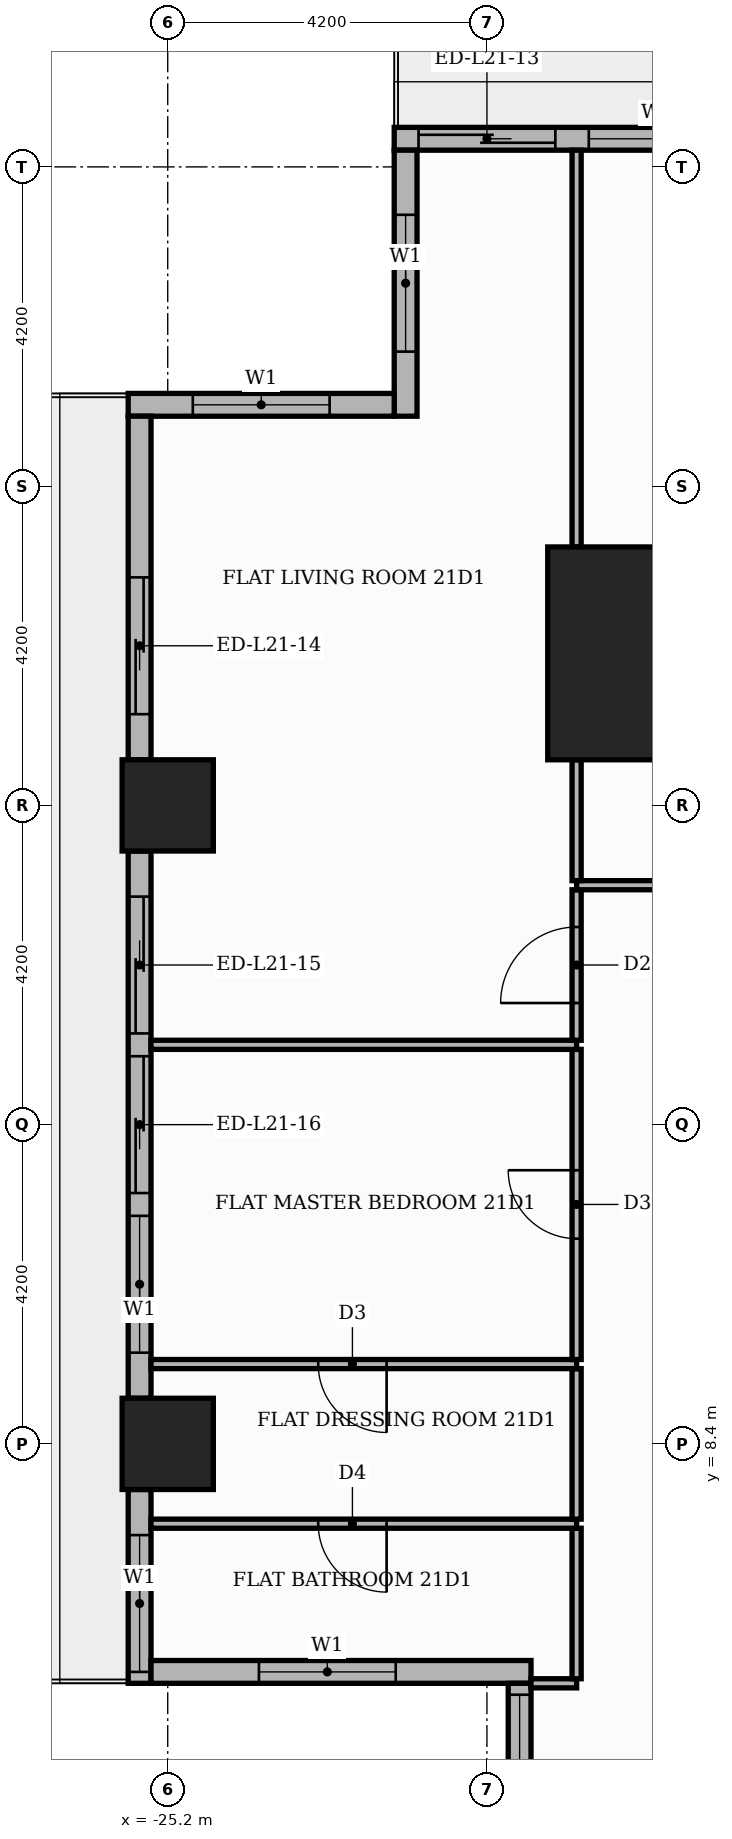
"""IFC4 building model, lengths in metres.
Left out: names, types, materials, properties, quantities, classifications, styles, units other than length and angle.
Written with IfcOpenShell. Run it as: python <this file> out.ifc"""

import sys

from ifc_helpers import new_model, si_unit, direction, frame, frame_2d, origin, origin_2d, place, context, subcontext, project, spatial, rectangle, extrude, element, fill, save


model = new_model("IFC4")
c1 = context("Model", 3, precision=1e-05, world=origin(), true_north=direction((0.0, 1.0)))
c2 = subcontext(c1, "Body", "Model", "MODEL_VIEW")
j1 = project(units=[si_unit("LENGTHUNIT", "METRE"), si_unit("PLANEANGLEUNIT", "RADIAN")], contexts=[c1])
p1 = place(None, origin())
s1 = spatial("IfcSite", under=j1, at=p1, CompositionType="ELEMENT")
p2 = place(p1, origin())
s2 = spatial("IfcBuilding", under=s1, at=p2, CompositionType="ELEMENT")
p3 = place(p2, frame((0.0, 0.0, 90.9)))
s3 = spatial("IfcBuildingStorey", under=s2, at=p3, CompositionType="ELEMENT", Elevation=90.9)
p4 = place(p3, frame((-18.8, 18.8, 0.0), z_axis=(0.0, 0.0, 1.0), x_axis=(1.0, 0.0, 0.0)))
e1 = element("IfcColumn", 1, at=p4, inside=s3, PredefinedType="COLUMN", context=c2, shape_type="SweptSolid", body=[
    extrude(rectangle(XDim=2.8, YDim=2.8, at=origin_2d()), origin(), (0.0, 0.0, 1.0), 3.9),
])
for number, where, z_axis, x_axis in (
    (2, (-25.2, 8.4, 0.0), (0.0, 0.0, 1.0), (1.0, 0.0, 0.0)),
    (3, (-25.2, 16.8, 0.0), (0.0, 0.0, 1.0), (1.0, 0.0, 0.0)),
):
    element("IfcColumn", number, at=place(p3, frame(where, z_axis=z_axis, x_axis=x_axis)), inside=s3, PredefinedType="COLUMN", context=c2, shape_type="SweptSolid", body=[
        extrude(rectangle(XDim=1.2, YDim=1.2, at=origin_2d()), origin(), (0.0, 0.0, 1.0), 3.9),
    ])
p5 = place(p3, frame((-17.4, 25.57, 0.0), z_axis=(0.0, 0.0, 1.0), x_axis=(-1.0, 0.0, 0.0)))
e4 = element("IfcWall", 4, at=p5, inside=s3, PredefinedType="STANDARD", context=c2, shape_type="SweptSolid", body=[
    extrude(rectangle(XDim=4.82, YDim=0.3, at=frame_2d((2.41, 0.0))), origin(), (0.0, 0.0, 1.0), 3.48),
])
p6 = place(p5, frame((2.7, 0.0, 0.0)))
e5 = element("IfcOpeningElement", 5, at=p6, cuts=e4, PredefinedType="OPENING", context=c2, shape_type="SweptSolid", body=[
    extrude(rectangle(XDim=1.8, YDim=2.4, at=frame_2d((0.9, 1.2))), frame((0.0, 0.16, 0.0), z_axis=(0.0, -1.0, 0.0), x_axis=(1.0, 0.0, 0.0)), (0.0, 0.0, 1.0), 0.32),
])
p7 = place(p5, frame((0.46, 0.0, 0.9)))
e6 = element("IfcOpeningElement", 6, at=p7, cuts=e4, PredefinedType="OPENING", context=c2, shape_type="SweptSolid", body=[
    extrude(rectangle(XDim=1.8, YDim=2.1, at=frame_2d((0.9, 1.05))), frame((0.0, 0.16, 0.0), z_axis=(0.0, -1.0, 0.0), x_axis=(1.0, 0.0, 0.0)), (0.0, 0.0, 1.0), 0.32),
])
p8 = place(p3, frame((-22.07, 25.42, 0.0), z_axis=(0.0, 0.0, 1.0), x_axis=(0.0, -1.0, 0.0)))
e7 = element("IfcWall", 7, at=p8, inside=s3, PredefinedType="STANDARD", context=c2, shape_type="SweptSolid", body=[
    extrude(rectangle(XDim=3.5, YDim=0.3, at=frame_2d((1.75, 0.0))), origin(), (0.0, 0.0, 1.0), 3.48),
])
p9 = place(p8, frame((0.85, 0.0, 0.9)))
e8 = element("IfcOpeningElement", 8, at=p9, cuts=e7, PredefinedType="OPENING", context=c2, shape_type="SweptSolid", body=[
    extrude(rectangle(XDim=1.8, YDim=2.1, at=frame_2d((0.9, 1.05))), frame((0.0, 0.16, 0.0), z_axis=(0.0, -1.0, 0.0), x_axis=(1.0, 0.0, 0.0)), (0.0, 0.0, 1.0), 0.32),
])
p10 = place(p3, frame((-22.22, 22.07, 0.0), z_axis=(0.0, 0.0, 1.0), x_axis=(-1.0, 0.0, 0.0)))
e9 = element("IfcWall", 9, at=p10, inside=s3, PredefinedType="STANDARD", context=c2, shape_type="SweptSolid", body=[
    extrude(rectangle(XDim=3.5, YDim=0.3, at=frame_2d((1.75, 0.0))), origin(), (0.0, 0.0, 1.0), 3.48),
])
p11 = place(p10, frame((0.85, 0.0, 0.9)))
e10 = element("IfcOpeningElement", 10, at=p11, cuts=e9, PredefinedType="OPENING", context=c2, shape_type="SweptSolid", body=[
    extrude(rectangle(XDim=1.8, YDim=2.1, at=frame_2d((0.9, 1.05))), frame((0.0, 0.16, 0.0), z_axis=(0.0, -1.0, 0.0), x_axis=(1.0, 0.0, 0.0)), (0.0, 0.0, 1.0), 0.32),
])
p12 = place(p3, frame((-25.57, 21.92, 0.0), z_axis=(0.0, 0.0, 1.0), x_axis=(0.0, -1.0, 0.0)))
e11 = element("IfcWall", 11, at=p12, inside=s3, PredefinedType="STANDARD", context=c2, shape_type="SweptSolid", body=[
    extrude(rectangle(XDim=4.52, YDim=0.3, at=frame_2d((2.26, 0.0))), origin(), (0.0, 0.0, 1.0), 3.48),
])
p13 = place(p12, frame((2.12, 0.0, 0.0)))
e12 = element("IfcOpeningElement", 12, at=p13, cuts=e11, PredefinedType="OPENING", context=c2, shape_type="SweptSolid", body=[
    extrude(rectangle(XDim=1.8, YDim=2.4, at=frame_2d((0.9, 1.2))), frame((0.0, 0.16, 0.0), z_axis=(0.0, -1.0, 0.0), x_axis=(1.0, 0.0, 0.0)), (0.0, 0.0, 1.0), 0.32),
])
p14 = place(p3, frame((-25.57, 16.2, 0.0), z_axis=(0.0, 0.0, 1.0), x_axis=(0.0, -1.0, 0.0)))
e13 = element("IfcWall", 13, at=p14, inside=s3, PredefinedType="STANDARD", context=c2, shape_type="SweptSolid", body=[
    extrude(rectangle(XDim=7.2, YDim=0.3, at=frame_2d((3.6, 0.0))), origin(), (0.0, 0.0, 1.0), 3.48),
])
p15 = place(p14, frame((0.6, 0.0, 0.0)))
e14 = element("IfcOpeningElement", 14, at=p15, cuts=e13, PredefinedType="OPENING", context=c2, shape_type="SweptSolid", body=[
    extrude(rectangle(XDim=1.8, YDim=2.4, at=frame_2d((0.9, 1.2))), frame((0.0, 0.16, 0.0), z_axis=(0.0, -1.0, 0.0), x_axis=(1.0, 0.0, 0.0)), (0.0, 0.0, 1.0), 0.32),
])
p16 = place(p14, frame((2.7, 0.0, 0.0)))
e15 = element("IfcOpeningElement", 15, at=p16, cuts=e13, PredefinedType="OPENING", context=c2, shape_type="SweptSolid", body=[
    extrude(rectangle(XDim=1.8, YDim=2.4, at=frame_2d((0.9, 1.2))), frame((0.0, 0.16, 0.0), z_axis=(0.0, -1.0, 0.0), x_axis=(1.0, 0.0, 0.0)), (0.0, 0.0, 1.0), 0.32),
])
p17 = place(p14, frame((4.8, 0.0, 0.9)))
e16 = element("IfcOpeningElement", 16, at=p17, cuts=e13, PredefinedType="OPENING", context=c2, shape_type="SweptSolid", body=[
    extrude(rectangle(XDim=1.8, YDim=2.1, at=frame_2d((0.9, 1.05))), frame((0.0, 0.16, 0.0), z_axis=(0.0, -1.0, 0.0), x_axis=(1.0, 0.0, 0.0)), (0.0, 0.0, 1.0), 0.32),
])
p18 = place(p3, frame((-25.57, 7.8, 0.0), z_axis=(0.0, 0.0, 1.0), x_axis=(0.0, -1.0, 0.0)))
e17 = element("IfcWall", 17, at=p18, inside=s3, PredefinedType="STANDARD", context=c2, shape_type="SweptSolid", body=[
    extrude(rectangle(XDim=2.55, YDim=0.3, at=frame_2d((1.275, 0.0))), origin(), (0.0, 0.0, 1.0), 3.48),
])
p19 = place(p18, frame((0.6, 0.0, 0.9)))
e18 = element("IfcOpeningElement", 18, at=p19, cuts=e17, PredefinedType="OPENING", context=c2, shape_type="SweptSolid", body=[
    extrude(rectangle(XDim=1.8, YDim=2.1, at=frame_2d((0.9, 1.05))), frame((0.0, 0.16, 0.0), z_axis=(0.0, -1.0, 0.0), x_axis=(1.0, 0.0, 0.0)), (0.0, 0.0, 1.0), 0.32),
])
p20 = place(p3, frame((-25.42, 5.4, 0.0), z_axis=(0.0, 0.0, 1.0), x_axis=(1.0, 0.0, 0.0)))
e19 = element("IfcWall", 19, at=p20, inside=s3, PredefinedType="STANDARD", context=c2, shape_type="SweptSolid", body=[
    extrude(rectangle(XDim=5.0, YDim=0.3, at=frame_2d((2.5, 0.0))), origin(), (0.0, 0.0, 1.0), 3.48),
])
p21 = place(p20, frame((1.42, 0.0, 0.9)))
e20 = element("IfcOpeningElement", 20, at=p21, cuts=e19, PredefinedType="OPENING", context=c2, shape_type="SweptSolid", body=[
    extrude(rectangle(XDim=1.8, YDim=2.1, at=frame_2d((0.9, 1.05))), frame((0.0, 0.16, 0.0), z_axis=(0.0, -1.0, 0.0), x_axis=(1.0, 0.0, 0.0)), (0.0, 0.0, 1.0), 0.32),
])
p22 = place(p3, frame((-20.57, 5.25, 0.0), z_axis=(0.0, 0.0, 1.0), x_axis=(0.0, -1.0, 0.0)))
e21 = element("IfcWall", 21, at=p22, inside=s3, PredefinedType="STANDARD", context=c2, shape_type="SweptSolid", body=[
    extrude(rectangle(XDim=10.8, YDim=0.3, at=frame_2d((5.4, 0.0))), origin(), (0.0, 0.0, 1.0), 3.48),
])
p23 = place(p22, frame((0.15, 0.0, 0.9)))
e22 = element("IfcOpeningElement", 22, at=p23, cuts=e21, PredefinedType="OPENING", context=c2, shape_type="SweptSolid", body=[
    extrude(rectangle(XDim=6.0, YDim=2.1, at=frame_2d((3.0, 1.05))), frame((0.0, 0.16, 0.0), z_axis=(0.0, -1.0, 0.0), x_axis=(1.0, 0.0, 0.0)), (0.0, 0.0, 1.0), 0.32),
])
p24 = place(p22, frame((6.45, 0.0, 0.9)))
e23 = element("IfcOpeningElement", 23, at=p24, cuts=e21, PredefinedType="OPENING", context=c2, shape_type="SweptSolid", body=[
    extrude(rectangle(XDim=3.9, YDim=2.1, at=frame_2d((1.95, 1.05))), frame((0.0, 0.16, 0.0), z_axis=(0.0, -1.0, 0.0), x_axis=(1.0, 0.0, 0.0)), (0.0, 0.0, 1.0), 0.32),
])
p25 = place(p3, frame((-20.42, 5.25, 0.0), z_axis=(0.0, 0.0, 1.0), x_axis=(1.0, 0.0, 0.0)))
e24 = element("IfcWall", 24, at=p25, inside=s3, PredefinedType="PARTITIONING", context=c2, shape_type="SweptSolid", body=[
    extrude(rectangle(XDim=0.6, YDim=0.12, at=frame_2d((0.3, 0.0))), origin(), (0.0, 0.0, 1.0), 3.48),
])
p26 = place(p3, frame((-19.82, 5.31, 0.0), z_axis=(0.0, 0.0, 1.0), x_axis=(0.0, 1.0, 0.0)))
e25 = element("IfcWall", 25, at=p26, inside=s3, PredefinedType="PARTITIONING", context=c2, shape_type="SweptSolid", body=[
    extrude(rectangle(XDim=1.98, YDim=0.12, at=frame_2d((0.99, 0.0))), origin(), (0.0, 0.0, 1.0), 3.48),
])
p27 = place(p3, frame((-25.42, 7.35, 0.0), z_axis=(0.0, 0.0, 1.0), x_axis=(1.0, 0.0, 0.0)))
e26 = element("IfcWall", 26, at=p27, inside=s3, PredefinedType="PARTITIONING", context=c2, shape_type="SweptSolid", body=[
    extrude(rectangle(XDim=5.6, YDim=0.12, at=frame_2d((2.8, 0.0))), origin(), (0.0, 0.0, 1.0), 3.48),
])
p28 = place(p27, frame((2.2, 0.0, 0.0)))
e27 = element("IfcOpeningElement", 27, at=p28, cuts=e26, PredefinedType="OPENING", context=c2, shape_type="SweptSolid", body=[
    extrude(rectangle(XDim=0.9, YDim=2.1, at=frame_2d((0.45, 1.05))), frame((0.0, 0.07, 0.0), z_axis=(0.0, -1.0, 0.0), x_axis=(1.0, 0.0, 0.0)), (0.0, 0.0, 1.0), 0.14),
])
p29 = place(p3, frame((-19.82, 7.41, 0.0), z_axis=(0.0, 0.0, 1.0), x_axis=(0.0, 1.0, 0.0)))
e28 = element("IfcWall", 28, at=p29, inside=s3, PredefinedType="PARTITIONING", context=c2, shape_type="SweptSolid", body=[
    extrude(rectangle(XDim=1.98, YDim=0.12, at=frame_2d((0.99, 0.0))), origin(), (0.0, 0.0, 1.0), 3.48),
])
p30 = place(p3, frame((-25.42, 9.45, 0.0), z_axis=(0.0, 0.0, 1.0), x_axis=(1.0, 0.0, 0.0)))
e29 = element("IfcWall", 29, at=p30, inside=s3, PredefinedType="PARTITIONING", context=c2, shape_type="SweptSolid", body=[
    extrude(rectangle(XDim=5.6, YDim=0.12, at=frame_2d((2.8, 0.0))), origin(), (0.0, 0.0, 1.0), 3.48),
])
p31 = place(p30, frame((2.2, 0.0, 0.0)))
e30 = element("IfcOpeningElement", 30, at=p31, cuts=e29, PredefinedType="OPENING", context=c2, shape_type="SweptSolid", body=[
    extrude(rectangle(XDim=0.9, YDim=2.1, at=frame_2d((0.45, 1.05))), frame((0.0, 0.07, 0.0), z_axis=(0.0, -1.0, 0.0), x_axis=(1.0, 0.0, 0.0)), (0.0, 0.0, 1.0), 0.14),
])
p32 = place(p3, frame((-19.82, 9.51, 0.0), z_axis=(0.0, 0.0, 1.0), x_axis=(0.0, 1.0, 0.0)))
e31 = element("IfcWall", 31, at=p32, inside=s3, PredefinedType="PARTITIONING", context=c2, shape_type="SweptSolid", body=[
    extrude(rectangle(XDim=4.08, YDim=0.12, at=frame_2d((2.04, 0.0))), origin(), (0.0, 0.0, 1.0), 3.48),
])
p33 = place(p32, frame((1.59, 0.0, 0.0)))
e32 = element("IfcOpeningElement", 32, at=p33, cuts=e31, PredefinedType="OPENING", context=c2, shape_type="SweptSolid", body=[
    extrude(rectangle(XDim=0.9, YDim=2.1, at=frame_2d((0.45, 1.05))), frame((0.0, 0.07, 0.0), z_axis=(0.0, -1.0, 0.0), x_axis=(1.0, 0.0, 0.0)), (0.0, 0.0, 1.0), 0.14),
])
p34 = place(p3, frame((-25.42, 13.65, 0.0), z_axis=(0.0, 0.0, 1.0), x_axis=(1.0, 0.0, 0.0)))
e33 = element("IfcWall", 33, at=p34, inside=s3, PredefinedType="PARTITIONING", context=c2, shape_type="SweptSolid", body=[
    extrude(rectangle(XDim=5.6, YDim=0.12, at=frame_2d((2.8, 0.0))), origin(), (0.0, 0.0, 1.0), 3.48),
])
p35 = place(p3, frame((-19.82, 13.71, 0.0), z_axis=(0.0, 0.0, 1.0), x_axis=(0.0, 1.0, 0.0)))
e34 = element("IfcWall", 34, at=p35, inside=s3, PredefinedType="PARTITIONING", context=c2, shape_type="SweptSolid", body=[
    extrude(rectangle(XDim=1.98, YDim=0.12, at=frame_2d((0.99, 0.0))), origin(), (0.0, 0.0, 1.0), 3.48),
])
p36 = place(p35, frame((0.49, 0.0, 0.0)))
e35 = element("IfcOpeningElement", 35, at=p36, cuts=e34, PredefinedType="OPENING", context=c2, shape_type="SweptSolid", body=[
    extrude(rectangle(XDim=1.0, YDim=2.1, at=frame_2d((0.5, 1.05))), frame((0.0, 0.07, 0.0), z_axis=(0.0, -1.0, 0.0), x_axis=(1.0, 0.0, 0.0)), (0.0, 0.0, 1.0), 0.14),
])
p37 = place(p3, frame((-19.82, 15.75, 0.0), z_axis=(0.0, 0.0, 1.0), x_axis=(1.0, 0.0, 0.0)))
e36 = element("IfcWall", 36, at=p37, inside=s3, PredefinedType="PARTITIONING", context=c2, shape_type="SweptSolid", body=[
    extrude(rectangle(XDim=6.07, YDim=0.12, at=frame_2d((3.035, 0.0))), origin(), (0.0, 0.0, 1.0), 3.48),
])
p38 = place(p37, frame((2.635, 0.0, 0.0)))
e37 = element("IfcOpeningElement", 37, at=p38, cuts=e36, PredefinedType="OPENING", context=c2, shape_type="SweptSolid", body=[
    extrude(rectangle(XDim=0.9, YDim=2.1, at=frame_2d((0.45, 1.05))), frame((0.0, 0.07, 0.0), z_axis=(0.0, -1.0, 0.0), x_axis=(1.0, 0.0, 0.0)), (0.0, 0.0, 1.0), 0.14),
])
p39 = place(p3, frame((-19.82, 15.81, 0.0), z_axis=(0.0, 0.0, 1.0), x_axis=(0.0, 1.0, 0.0)))
e38 = element("IfcWall", 38, at=p39, inside=s3, PredefinedType="PARTITIONING", context=c2, shape_type="SweptSolid", body=[
    extrude(rectangle(XDim=1.59, YDim=0.12, at=frame_2d((0.795, 0.0))), origin(), (0.0, 0.0, 1.0), 3.48),
])
p40 = place(p3, frame((-19.82, 20.2, 0.0), z_axis=(0.0, 0.0, 1.0), x_axis=(0.0, 1.0, 0.0)))
e39 = element("IfcWall", 39, at=p40, inside=s3, PredefinedType="PARTITIONING", context=c2, shape_type="SweptSolid", body=[
    extrude(rectangle(XDim=5.22, YDim=0.12, at=frame_2d((2.61, 0.0))), origin(), (0.0, 0.0, 1.0), 3.48),
])
p41 = place(p6, origin())
e40 = element("IfcDoor", 40, at=p41, inside=s3, OperationType="SLIDING_TO_LEFT", PredefinedType="DOOR", context=c2, shape_type="SweptSolid", body=[
    extrude(rectangle(XDim=1.8, YDim=2.4, at=frame_2d((0.9, 1.2))), frame((0.0, 0.025, 0.0), z_axis=(0.0, -1.0, 0.0), x_axis=(1.0, 0.0, 0.0)), (0.0, 0.0, 1.0), 0.05),
])
fill(e5, e40)
p42 = place(p7, origin())
e41 = element("IfcWindow", 41, at=p42, inside=s3, PartitioningType="SINGLE_PANEL", PredefinedType="WINDOW", context=c2, shape_type="SweptSolid", body=[
    extrude(rectangle(XDim=1.8, YDim=2.1, at=frame_2d((0.9, 1.05))), frame((0.0, 0.03, 0.0), z_axis=(0.0, -1.0, 0.0), x_axis=(1.0, 0.0, 0.0)), (0.0, 0.0, 1.0), 0.06),
])
fill(e6, e41)
p43 = place(p9, origin())
e42 = element("IfcWindow", 42, at=p43, inside=s3, PartitioningType="SINGLE_PANEL", PredefinedType="WINDOW", context=c2, shape_type="SweptSolid", body=[
    extrude(rectangle(XDim=1.8, YDim=2.1, at=frame_2d((0.9, 1.05))), frame((0.0, 0.03, 0.0), z_axis=(0.0, -1.0, 0.0), x_axis=(1.0, 0.0, 0.0)), (0.0, 0.0, 1.0), 0.06),
])
fill(e8, e42)
p44 = place(p11, origin())
e43 = element("IfcWindow", 43, at=p44, inside=s3, PartitioningType="SINGLE_PANEL", PredefinedType="WINDOW", context=c2, shape_type="SweptSolid", body=[
    extrude(rectangle(XDim=1.8, YDim=2.1, at=frame_2d((0.9, 1.05))), frame((0.0, 0.03, 0.0), z_axis=(0.0, -1.0, 0.0), x_axis=(1.0, 0.0, 0.0)), (0.0, 0.0, 1.0), 0.06),
])
fill(e10, e43)
p45 = place(p13, origin())
e44 = element("IfcDoor", 44, at=p45, inside=s3, OperationType="SLIDING_TO_RIGHT", PredefinedType="DOOR", context=c2, shape_type="SweptSolid", body=[
    extrude(rectangle(XDim=1.8, YDim=2.4, at=frame_2d((0.9, 1.2))), frame((0.0, 0.025, 0.0), z_axis=(0.0, -1.0, 0.0), x_axis=(1.0, 0.0, 0.0)), (0.0, 0.0, 1.0), 0.05),
])
fill(e12, e44)
p46 = place(p15, origin())
e45 = element("IfcDoor", 45, at=p46, inside=s3, OperationType="SLIDING_TO_LEFT", PredefinedType="DOOR", context=c2, shape_type="SweptSolid", body=[
    extrude(rectangle(XDim=1.8, YDim=2.4, at=frame_2d((0.9, 1.2))), frame((0.0, 0.025, 0.0), z_axis=(0.0, -1.0, 0.0), x_axis=(1.0, 0.0, 0.0)), (0.0, 0.0, 1.0), 0.05),
])
fill(e14, e45)
p47 = place(p16, origin())
e46 = element("IfcDoor", 46, at=p47, inside=s3, OperationType="SLIDING_TO_RIGHT", PredefinedType="DOOR", context=c2, shape_type="SweptSolid", body=[
    extrude(rectangle(XDim=1.8, YDim=2.4, at=frame_2d((0.9, 1.2))), frame((0.0, 0.025, 0.0), z_axis=(0.0, -1.0, 0.0), x_axis=(1.0, 0.0, 0.0)), (0.0, 0.0, 1.0), 0.05),
])
fill(e15, e46)
p48 = place(p17, origin())
e47 = element("IfcWindow", 47, at=p48, inside=s3, PartitioningType="SINGLE_PANEL", PredefinedType="WINDOW", context=c2, shape_type="SweptSolid", body=[
    extrude(rectangle(XDim=1.8, YDim=2.1, at=frame_2d((0.9, 1.05))), frame((0.0, 0.03, 0.0), z_axis=(0.0, -1.0, 0.0), x_axis=(1.0, 0.0, 0.0)), (0.0, 0.0, 1.0), 0.06),
])
fill(e16, e47)
p49 = place(p19, origin())
e48 = element("IfcWindow", 48, at=p49, inside=s3, PartitioningType="SINGLE_PANEL", PredefinedType="WINDOW", context=c2, shape_type="SweptSolid", body=[
    extrude(rectangle(XDim=1.8, YDim=2.1, at=frame_2d((0.9, 1.05))), frame((0.0, 0.03, 0.0), z_axis=(0.0, -1.0, 0.0), x_axis=(1.0, 0.0, 0.0)), (0.0, 0.0, 1.0), 0.06),
])
fill(e18, e48)
p50 = place(p21, origin())
e49 = element("IfcWindow", 49, at=p50, inside=s3, PartitioningType="SINGLE_PANEL", PredefinedType="WINDOW", context=c2, shape_type="SweptSolid", body=[
    extrude(rectangle(XDim=1.8, YDim=2.1, at=frame_2d((0.9, 1.05))), frame((0.0, 0.03, 0.0), z_axis=(0.0, -1.0, 0.0), x_axis=(1.0, 0.0, 0.0)), (0.0, 0.0, 1.0), 0.06),
])
fill(e20, e49)
p51 = place(p23, origin())
e50 = element("IfcWindow", 50, at=p51, inside=s3, PartitioningType="SINGLE_PANEL", PredefinedType="WINDOW", context=c2, shape_type="SweptSolid", body=[
    extrude(rectangle(XDim=6.0, YDim=2.1, at=frame_2d((3.0, 1.05))), frame((0.0, 0.03, 0.0), z_axis=(0.0, -1.0, 0.0), x_axis=(1.0, 0.0, 0.0)), (0.0, 0.0, 1.0), 0.06),
])
fill(e22, e50)
p52 = place(p36, origin())
e51 = element("IfcDoor", 51, at=p52, inside=s3, OperationType="SINGLE_SWING_LEFT", PredefinedType="DOOR", context=c2, shape_type="SweptSolid", body=[
    extrude(rectangle(XDim=1.0, YDim=2.1, at=frame_2d((0.5, 1.05))), frame((0.0, 0.025, 0.0), z_axis=(0.0, -1.0, 0.0), x_axis=(1.0, 0.0, 0.0)), (0.0, 0.0, 1.0), 0.05),
])
fill(e35, e51)
p53 = place(p33, origin())
e52 = element("IfcDoor", 52, at=p53, inside=s3, OperationType="SINGLE_SWING_RIGHT", PredefinedType="DOOR", context=c2, shape_type="SweptSolid", body=[
    extrude(rectangle(XDim=0.9, YDim=2.1, at=frame_2d((0.45, 1.05))), frame((0.0, 0.025, 0.0), z_axis=(0.0, -1.0, 0.0), x_axis=(1.0, 0.0, 0.0)), (0.0, 0.0, 1.0), 0.05),
])
fill(e32, e52)
p54 = place(p31, frame((0.9, 0.0, 0.0), z_axis=(0.0, 0.0, 1.0), x_axis=(-1.0, 0.0, 0.0)))
e53 = element("IfcDoor", 53, at=p54, inside=s3, OperationType="SINGLE_SWING_RIGHT", PredefinedType="DOOR", context=c2, shape_type="SweptSolid", body=[
    extrude(rectangle(XDim=0.9, YDim=2.1, at=frame_2d((0.45, 1.05))), frame((0.0, 0.025, 0.0), z_axis=(0.0, -1.0, 0.0), x_axis=(1.0, 0.0, 0.0)), (0.0, 0.0, 1.0), 0.05),
])
fill(e30, e53)
p55 = place(p28, frame((0.9, 0.0, 0.0), z_axis=(0.0, 0.0, 1.0), x_axis=(-1.0, 0.0, 0.0)))
e54 = element("IfcDoor", 54, at=p55, inside=s3, OperationType="SINGLE_SWING_RIGHT", PredefinedType="DOOR", context=c2, shape_type="SweptSolid", body=[
    extrude(rectangle(XDim=0.9, YDim=2.1, at=frame_2d((0.45, 1.05))), frame((0.0, 0.025, 0.0), z_axis=(0.0, -1.0, 0.0), x_axis=(1.0, 0.0, 0.0)), (0.0, 0.0, 1.0), 0.05),
])
fill(e27, e54)
save(model, sys.argv[1])
